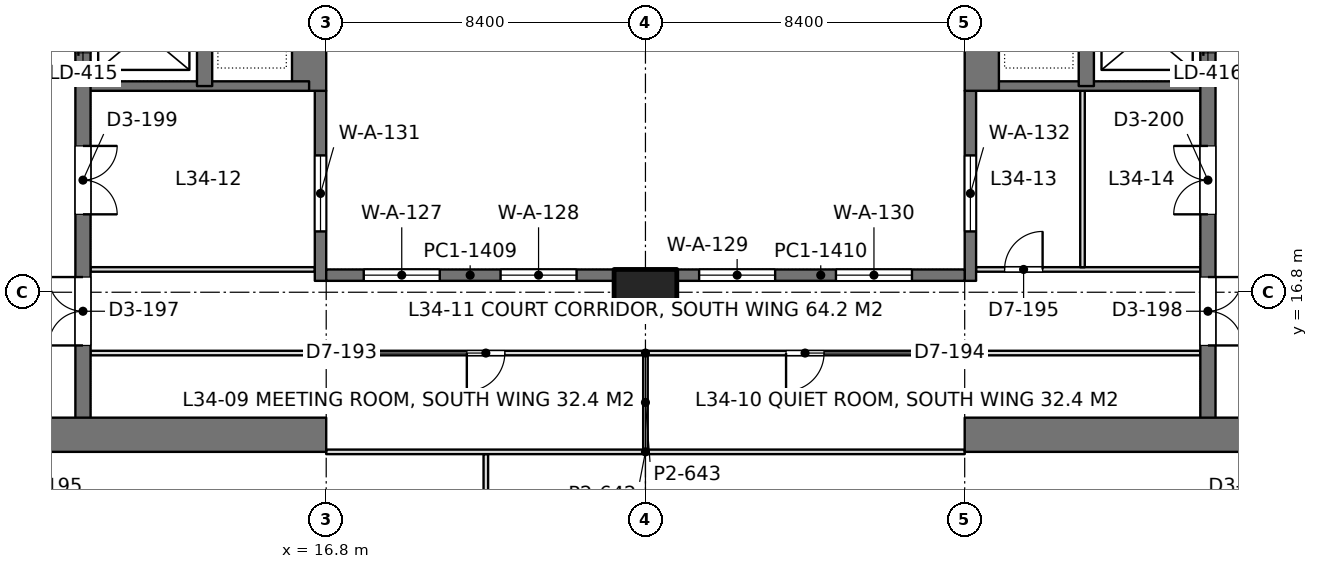
"""IFC4 building model, lengths in metres.
Left out: names, types, materials, properties, quantities, classifications, styles, units other than length and angle.
Written with IfcOpenShell. Run it as: python <this file> out.ifc"""

import sys

from ifc_helpers import new_model, si_unit, direction, frame, frame_2d, origin, origin_2d, place, context, subcontext, project, spatial, rectangle, extrude, element, fill, save


model = new_model("IFC4")
c1 = context("Model", 3, precision=1e-05, world=origin(), true_north=direction((0.0, 1.0)))
c2 = subcontext(c1, "Body", "Model", "MODEL_VIEW")
j1 = project(units=[si_unit("LENGTHUNIT", "METRE"), si_unit("PLANEANGLEUNIT", "RADIAN")], contexts=[c1])
p1 = place(None, origin())
s1 = spatial("IfcSite", under=j1, at=p1, CompositionType="ELEMENT")
p2 = place(p1, origin())
s2 = spatial("IfcBuilding", under=s1, at=p2, CompositionType="ELEMENT")
p3 = place(p2, frame((0.0, 0.0, 151.2)))
s3 = spatial("IfcBuildingStorey", under=s2, at=p3, CompositionType="ELEMENT", Elevation=151.2)
p4 = place(p3, frame((25.2, 16.8, 0.0), z_axis=(0.0, 0.0, 1.0), x_axis=(1.0, 0.0, 0.0)))
e1 = element("IfcColumn", 1, at=p4, inside=s3, PredefinedType="COLUMN", context=c2, shape_type="SweptSolid", body=[
    extrude(rectangle(XDim=1.65, YDim=1.2, at=origin_2d()), origin(), (0.0, 0.0, 1.0), 4.2),
])
p5 = place(p3, frame((-1.2, 13.05, 0.0), z_axis=(0.0, 0.0, 1.0), x_axis=(1.0, 0.0, 0.0)))
e2 = element("IfcWall", 2, at=p5, inside=s3, PredefinedType="SHEAR", context=c2, shape_type="SweptSolid", body=[
    extrude(rectangle(XDim=18.0, YDim=0.9, at=frame_2d((9.0, 0.0))), origin(), (0.0, 0.0, 1.0), 4.2),
])
p6 = place(p5, frame((8.95, 0.0, 0.0)))
e3 = element("IfcOpeningElement", 3, at=p6, cuts=e2, PredefinedType="OPENING", context=c2, shape_type="SweptSolid", body=[
    extrude(rectangle(XDim=1.8, YDim=2.4, at=frame_2d((0.9, 1.2))), frame((0.0, 0.46, 0.0), z_axis=(0.0, -1.0, 0.0), x_axis=(1.0, 0.0, 0.0)), (0.0, 0.0, 1.0), 0.92),
])
p7 = place(p3, frame((16.35, 22.1, 0.0), z_axis=(0.0, 0.0, 1.0), x_axis=(0.0, 1.0, 0.0)))
e4 = element("IfcWall", 4, at=p7, inside=s3, PredefinedType="SHEAR", context=c2, shape_type="SweptSolid", body=[
    extrude(rectangle(XDim=15.25, YDim=0.9, at=frame_2d((7.625, 0.0))), origin(), (0.0, 0.0, 1.0), 4.2),
])
p8 = place(p3, frame((10.4, 13.05, 0.0), z_axis=(0.0, 0.0, 1.0), x_axis=(0.0, 1.0, 0.0)))
e5 = element("IfcWall", 5, at=p8, inside=s3, PredefinedType="SHEAR", context=c2, shape_type="SweptSolid", body=[
    extrude(rectangle(XDim=24.3, YDim=0.4, at=frame_2d((12.15, 0.0))), origin(), (0.0, 0.0, 1.0), 4.2),
])
p9 = place(p8, frame((10.05, 0.0, 0.0)))
e6 = element("IfcOpeningElement", 6, at=p9, cuts=e5, PredefinedType="OPENING", context=c2, shape_type="SweptSolid", body=[
    extrude(rectangle(XDim=1.1, YDim=2.2, at=frame_2d((0.55, 1.1))), frame((0.0, 0.21, 0.0), z_axis=(0.0, -1.0, 0.0), x_axis=(1.0, 0.0, 0.0)), (0.0, 0.0, 1.0), 0.42),
])
p10 = place(p8, frame((12.9, 0.0, 0.0)))
e7 = element("IfcOpeningElement", 7, at=p10, cuts=e5, PredefinedType="OPENING", context=c2, shape_type="SweptSolid", body=[
    extrude(rectangle(XDim=1.1, YDim=2.2, at=frame_2d((0.55, 1.1))), frame((0.0, 0.21, 0.0), z_axis=(0.0, -1.0, 0.0), x_axis=(1.0, 0.0, 0.0)), (0.0, 0.0, 1.0), 0.42),
])
p11 = place(p8, frame((21.45, 0.0, 0.0)))
e8 = element("IfcOpeningElement", 8, at=p11, cuts=e5, PredefinedType="OPENING", context=c2, shape_type="SweptSolid", body=[
    extrude(rectangle(XDim=1.1, YDim=2.2, at=frame_2d((0.55, 1.1))), frame((0.0, 0.21, 0.0), z_axis=(0.0, -1.0, 0.0), x_axis=(1.0, 0.0, 0.0)), (0.0, 0.0, 1.0), 0.42),
])
p12 = place(p8, frame((2.35, 0.0, 0.0)))
e9 = element("IfcOpeningElement", 9, at=p12, cuts=e5, PredefinedType="OPENING", context=c2, shape_type="SweptSolid", body=[
    extrude(rectangle(XDim=1.8, YDim=2.4, at=frame_2d((0.9, 1.2))), frame((0.0, 0.21, 0.0), z_axis=(0.0, -1.0, 0.0), x_axis=(1.0, 0.0, 0.0)), (0.0, 0.0, 1.0), 0.42),
])
p13 = place(p8, frame((5.8, 0.0, 0.0)))
e10 = element("IfcOpeningElement", 10, at=p13, cuts=e5, PredefinedType="OPENING", context=c2, shape_type="SweptSolid", body=[
    extrude(rectangle(XDim=1.8, YDim=2.4, at=frame_2d((0.9, 1.2))), frame((0.0, 0.21, 0.0), z_axis=(0.0, -1.0, 0.0), x_axis=(1.0, 0.0, 0.0)), (0.0, 0.0, 1.0), 0.42),
])
p14 = place(p3, frame((13.6, 22.225, 0.0), z_axis=(0.0, 0.0, 1.0), x_axis=(0.0, 1.0, 0.0)))
e11 = element("IfcWall", 11, at=p14, inside=s3, PredefinedType="SHEAR", context=c2, shape_type="SweptSolid", body=[
    extrude(rectangle(XDim=15.125, YDim=0.4, at=frame_2d((7.562, 0.0))), origin(), (0.0, 0.0, 1.0), 4.2),
])
p15 = place(p3, frame((10.4, 22.225, 0.0), z_axis=(0.0, 0.0, 1.0), x_axis=(1.0, 0.0, 0.0)))
e12 = element("IfcWall", 12, at=p15, inside=s3, PredefinedType="SHEAR", context=c2, shape_type="SweptSolid", body=[
    extrude(rectangle(XDim=5.95, YDim=0.25, at=frame_2d((2.975, 0.0))), origin(), (0.0, 0.0, 1.0), 4.2),
])
p16 = place(p3, frame((33.6, 13.05, 0.0), z_axis=(0.0, 0.0, 1.0), x_axis=(1.0, 0.0, 0.0)))
e13 = element("IfcWall", 13, at=p16, inside=s3, PredefinedType="SHEAR", context=c2, shape_type="SweptSolid", body=[
    extrude(rectangle(XDim=18.0, YDim=0.9, at=frame_2d((9.0, 0.0))), origin(), (0.0, 0.0, 1.0), 4.2),
])
p17 = place(p16, frame((7.25, 0.0, 0.0)))
e14 = element("IfcOpeningElement", 14, at=p17, cuts=e13, PredefinedType="OPENING", context=c2, shape_type="SweptSolid", body=[
    extrude(rectangle(XDim=1.8, YDim=2.4, at=frame_2d((0.9, 1.2))), frame((0.0, 0.46, 0.0), z_axis=(0.0, -1.0, 0.0), x_axis=(1.0, 0.0, 0.0)), (0.0, 0.0, 1.0), 0.92),
])
p18 = place(p3, frame((34.05, 22.1, 0.0), z_axis=(0.0, 0.0, 1.0), x_axis=(0.0, 1.0, 0.0)))
e15 = element("IfcWall", 15, at=p18, inside=s3, PredefinedType="SHEAR", context=c2, shape_type="SweptSolid", body=[
    extrude(rectangle(XDim=15.25, YDim=0.9, at=frame_2d((7.625, 0.0))), origin(), (0.0, 0.0, 1.0), 4.2),
])
p19 = place(p3, frame((40.0, 13.05, 0.0), z_axis=(0.0, 0.0, 1.0), x_axis=(0.0, 1.0, 0.0)))
e16 = element("IfcWall", 16, at=p19, inside=s3, PredefinedType="SHEAR", context=c2, shape_type="SweptSolid", body=[
    extrude(rectangle(XDim=24.3, YDim=0.4, at=frame_2d((12.15, 0.0))), origin(), (0.0, 0.0, 1.0), 4.2),
])
p20 = place(p19, frame((10.05, 0.0, 0.0)))
e17 = element("IfcOpeningElement", 17, at=p20, cuts=e16, PredefinedType="OPENING", context=c2, shape_type="SweptSolid", body=[
    extrude(rectangle(XDim=1.1, YDim=2.2, at=frame_2d((0.55, 1.1))), frame((0.0, 0.21, 0.0), z_axis=(0.0, -1.0, 0.0), x_axis=(1.0, 0.0, 0.0)), (0.0, 0.0, 1.0), 0.42),
])
p21 = place(p19, frame((12.9, 0.0, 0.0)))
e18 = element("IfcOpeningElement", 18, at=p21, cuts=e16, PredefinedType="OPENING", context=c2, shape_type="SweptSolid", body=[
    extrude(rectangle(XDim=1.1, YDim=2.2, at=frame_2d((0.55, 1.1))), frame((0.0, 0.21, 0.0), z_axis=(0.0, -1.0, 0.0), x_axis=(1.0, 0.0, 0.0)), (0.0, 0.0, 1.0), 0.42),
])
p22 = place(p19, frame((21.45, 0.0, 0.0)))
e19 = element("IfcOpeningElement", 19, at=p22, cuts=e16, PredefinedType="OPENING", context=c2, shape_type="SweptSolid", body=[
    extrude(rectangle(XDim=1.1, YDim=2.2, at=frame_2d((0.55, 1.1))), frame((0.0, 0.21, 0.0), z_axis=(0.0, -1.0, 0.0), x_axis=(1.0, 0.0, 0.0)), (0.0, 0.0, 1.0), 0.42),
])
p23 = place(p19, frame((2.35, 0.0, 0.0)))
e20 = element("IfcOpeningElement", 20, at=p23, cuts=e16, PredefinedType="OPENING", context=c2, shape_type="SweptSolid", body=[
    extrude(rectangle(XDim=1.8, YDim=2.4, at=frame_2d((0.9, 1.2))), frame((0.0, 0.21, 0.0), z_axis=(0.0, -1.0, 0.0), x_axis=(1.0, 0.0, 0.0)), (0.0, 0.0, 1.0), 0.42),
])
p24 = place(p19, frame((5.8, 0.0, 0.0)))
e21 = element("IfcOpeningElement", 21, at=p24, cuts=e16, PredefinedType="OPENING", context=c2, shape_type="SweptSolid", body=[
    extrude(rectangle(XDim=1.8, YDim=2.4, at=frame_2d((0.9, 1.2))), frame((0.0, 0.21, 0.0), z_axis=(0.0, -1.0, 0.0), x_axis=(1.0, 0.0, 0.0)), (0.0, 0.0, 1.0), 0.42),
])
p25 = place(p3, frame((36.8, 22.225, 0.0), z_axis=(0.0, 0.0, 1.0), x_axis=(0.0, 1.0, 0.0)))
e22 = element("IfcWall", 22, at=p25, inside=s3, PredefinedType="SHEAR", context=c2, shape_type="SweptSolid", body=[
    extrude(rectangle(XDim=15.125, YDim=0.4, at=frame_2d((7.562, 0.0))), origin(), (0.0, 0.0, 1.0), 4.2),
])
p26 = place(p3, frame((40.0, 22.225, 0.0), z_axis=(0.0, 0.0, 1.0), x_axis=(-1.0, 0.0, 0.0)))
e23 = element("IfcWall", 23, at=p26, inside=s3, PredefinedType="SHEAR", context=c2, shape_type="SweptSolid", body=[
    extrude(rectangle(XDim=5.95, YDim=0.25, at=frame_2d((2.975, 0.0))), origin(), (0.0, 0.0, 1.0), 4.2),
])
p27 = place(p3, frame((16.65, 17.1, 0.0), z_axis=(0.0, 0.0, 1.0), x_axis=(0.0, 1.0, 0.0)))
e24 = element("IfcWall", 24, at=p27, inside=s3, PredefinedType="SOLIDWALL", context=c2, shape_type="SweptSolid", body=[
    extrude(rectangle(XDim=5.0, YDim=0.3, at=frame_2d((2.5, 0.0))), origin(), (0.0, 0.0, 1.0), 4.05),
])
p28 = place(p27, frame((1.3, 0.0, 0.1)))
e25 = element("IfcOpeningElement", 25, at=p28, cuts=e24, PredefinedType="OPENING", context=c2, shape_type="SweptSolid", body=[
    extrude(rectangle(XDim=2.0, YDim=3.0, at=frame_2d((1.0, 1.5))), frame((0.0, 0.16, 0.0), z_axis=(0.0, -1.0, 0.0), x_axis=(1.0, 0.0, 0.0)), (0.0, 0.0, 1.0), 0.32),
])
p29 = place(p3, frame((33.75, 17.1, 0.0), z_axis=(0.0, 0.0, 1.0), x_axis=(0.0, 1.0, 0.0)))
e26 = element("IfcWall", 26, at=p29, inside=s3, PredefinedType="SOLIDWALL", context=c2, shape_type="SweptSolid", body=[
    extrude(rectangle(XDim=5.0, YDim=0.3, at=frame_2d((2.5, 0.0))), origin(), (0.0, 0.0, 1.0), 4.05),
])
p30 = place(p29, frame((1.3, 0.0, 0.1)))
e27 = element("IfcOpeningElement", 27, at=p30, cuts=e26, PredefinedType="OPENING", context=c2, shape_type="SweptSolid", body=[
    extrude(rectangle(XDim=2.0, YDim=3.0, at=frame_2d((1.0, 1.5))), frame((0.0, 0.16, 0.0), z_axis=(0.0, -1.0, 0.0), x_axis=(1.0, 0.0, 0.0)), (0.0, 0.0, 1.0), 0.32),
])
p31 = place(p3, frame((16.8, 17.25, 0.0), z_axis=(0.0, 0.0, 1.0), x_axis=(1.0, 0.0, 0.0)))
e28 = element("IfcWall", 28, at=p31, inside=s3, PredefinedType="SOLIDWALL", context=c2, shape_type="SweptSolid", body=[
    extrude(rectangle(XDim=7.575, YDim=0.3, at=frame_2d((3.788, 0.0))), origin(), (0.0, 0.0, 1.0), 4.05),
])
p32 = place(p31, frame((0.988, 0.0, 0.1)))
e29 = element("IfcOpeningElement", 29, at=p32, cuts=e28, PredefinedType="OPENING", context=c2, shape_type="SweptSolid", body=[
    extrude(rectangle(XDim=2.0, YDim=3.0, at=frame_2d((1.0, 1.5))), frame((0.0, 0.16, 0.0), z_axis=(0.0, -1.0, 0.0), x_axis=(1.0, 0.0, 0.0)), (0.0, 0.0, 1.0), 0.32),
])
p33 = place(p31, frame((4.587, 0.0, 0.1)))
e30 = element("IfcOpeningElement", 30, at=p33, cuts=e28, PredefinedType="OPENING", context=c2, shape_type="SweptSolid", body=[
    extrude(rectangle(XDim=2.0, YDim=3.0, at=frame_2d((1.0, 1.5))), frame((0.0, 0.16, 0.0), z_axis=(0.0, -1.0, 0.0), x_axis=(1.0, 0.0, 0.0)), (0.0, 0.0, 1.0), 0.32),
])
p34 = place(p3, frame((26.025, 17.25, 0.0), z_axis=(0.0, 0.0, 1.0), x_axis=(1.0, 0.0, 0.0)))
e31 = element("IfcWall", 31, at=p34, inside=s3, PredefinedType="SOLIDWALL", context=c2, shape_type="SweptSolid", body=[
    extrude(rectangle(XDim=7.575, YDim=0.3, at=frame_2d((3.788, 0.0))), origin(), (0.0, 0.0, 1.0), 4.05),
])
p35 = place(p34, frame((0.587, 0.0, 0.1)))
e32 = element("IfcOpeningElement", 32, at=p35, cuts=e31, PredefinedType="OPENING", context=c2, shape_type="SweptSolid", body=[
    extrude(rectangle(XDim=2.0, YDim=3.0, at=frame_2d((1.0, 1.5))), frame((0.0, 0.16, 0.0), z_axis=(0.0, -1.0, 0.0), x_axis=(1.0, 0.0, 0.0)), (0.0, 0.0, 1.0), 0.32),
])
p36 = place(p34, frame((4.188, 0.0, 0.1)))
e33 = element("IfcOpeningElement", 33, at=p36, cuts=e31, PredefinedType="OPENING", context=c2, shape_type="SweptSolid", body=[
    extrude(rectangle(XDim=2.0, YDim=3.0, at=frame_2d((1.0, 1.5))), frame((0.0, 0.16, 0.0), z_axis=(0.0, -1.0, 0.0), x_axis=(1.0, 0.0, 0.0)), (0.0, 0.0, 1.0), 0.32),
])
p37 = place(p3, frame((10.598, 17.4, 0.0), z_axis=(0.0, 0.0, 1.0), x_axis=(1.0, 0.0, 0.0)))
e34 = element("IfcWall", 34, at=p37, inside=s3, PredefinedType="PARTITIONING", context=c2, shape_type="SweptSolid", body=[
    extrude(rectangle(XDim=5.904, YDim=0.12, at=frame_2d((2.952, 0.0))), origin(), (0.0, 0.0, 1.0), 3.55),
])
p38 = place(p3, frame((33.898, 17.4, 0.0), z_axis=(0.0, 0.0, 1.0), x_axis=(1.0, 0.0, 0.0)))
e35 = element("IfcWall", 35, at=p38, inside=s3, PredefinedType="PARTITIONING", context=c2, shape_type="SweptSolid", body=[
    extrude(rectangle(XDim=5.904, YDim=0.12, at=frame_2d((2.952, 0.0))), origin(), (0.0, 0.0, 1.0), 3.55),
])
p39 = place(p38, frame((0.752, 0.0, 0.0)))
e36 = element("IfcOpeningElement", 36, at=p39, cuts=e35, PredefinedType="OPENING", context=c2, shape_type="SweptSolid", body=[
    extrude(rectangle(XDim=1.0, YDim=2.4, at=frame_2d((0.5, 1.2))), frame((0.0, 0.07, 0.0), z_axis=(0.0, -1.0, 0.0), x_axis=(1.0, 0.0, 0.0)), (0.0, 0.0, 1.0), 0.14),
])
p40 = place(p3, frame((36.7, 17.458, 0.0), z_axis=(0.0, 0.0, 1.0), x_axis=(0.0, 1.0, 0.0)))
e37 = element("IfcWall", 37, at=p40, inside=s3, PredefinedType="PARTITIONING", context=c2, shape_type="SweptSolid", body=[
    extrude(rectangle(XDim=4.644, YDim=0.12, at=frame_2d((2.322, 0.0))), origin(), (0.0, 0.0, 1.0), 3.6),
])
p41 = place(p3, frame((21.0, 6.298, 0.0), z_axis=(0.0, 0.0, 1.0), x_axis=(0.0, 1.0, 0.0)))
e38 = element("IfcWall", 38, at=p41, inside=s3, PredefinedType="PARTITIONING", context=c2, shape_type="SweptSolid", body=[
    extrude(rectangle(XDim=6.244, YDim=0.12, at=frame_2d((3.122, 0.0))), origin(), (0.0, 0.0, 1.0), 3.55),
])
for number, where, z_axis, x_axis in (
    (39, (10.598, 15.2, 0.0), (0.0, 0.0, 1.0), (1.0, 0.0, 0.0)),
    (40, (33.598, 15.2, 0.0), (0.0, 0.0, 1.0), (1.0, 0.0, 0.0)),
):
    element("IfcWall", number, at=place(p3, frame(where, z_axis=z_axis, x_axis=x_axis)), inside=s3, PredefinedType="PARTITIONING", context=c2, shape_type="SweptSolid", body=[
        extrude(rectangle(XDim=6.204, YDim=0.12, at=frame_2d((3.102, 0.0))), origin(), (0.0, 0.0, 1.0), 3.55),
    ])
p42 = place(p3, frame((25.2, 12.658, 0.0), z_axis=(0.0, 0.0, 1.0), x_axis=(0.0, 1.0, 0.0)))
e41 = element("IfcWall", 41, at=p42, inside=s3, PredefinedType="PARTITIONING", context=c2, shape_type="SweptSolid", body=[
    extrude(rectangle(XDim=2.484, YDim=0.12, at=frame_2d((1.242, 0.0))), origin(), (0.0, 0.0, 1.0), 3.55),
])
p43 = place(p3, frame((16.798, 15.2, 0.0), z_axis=(0.0, 0.0, 1.0), x_axis=(1.0, 0.0, 0.0)))
e42 = element("IfcWall", 42, at=p43, inside=s3, PredefinedType="PARTITIONING", context=c2, shape_type="SweptSolid", body=[
    extrude(rectangle(XDim=16.804, YDim=0.12, at=frame_2d((8.402, 0.0))), origin(), (0.0, 0.0, 1.0), 3.55),
])
p44 = place(p43, frame((3.702, 0.0, 0.0)))
e43 = element("IfcOpeningElement", 43, at=p44, cuts=e42, PredefinedType="OPENING", context=c2, shape_type="SweptSolid", body=[
    extrude(rectangle(XDim=1.0, YDim=2.4, at=frame_2d((0.5, 1.2))), frame((0.0, 0.07, 0.0), z_axis=(0.0, -1.0, 0.0), x_axis=(1.0, 0.0, 0.0)), (0.0, 0.0, 1.0), 0.14),
])
p45 = place(p43, frame((12.102, 0.0, 0.0)))
e44 = element("IfcOpeningElement", 44, at=p45, cuts=e42, PredefinedType="OPENING", context=c2, shape_type="SweptSolid", body=[
    extrude(rectangle(XDim=1.0, YDim=2.4, at=frame_2d((0.5, 1.2))), frame((0.0, 0.07, 0.0), z_axis=(0.0, -1.0, 0.0), x_axis=(1.0, 0.0, 0.0)), (0.0, 0.0, 1.0), 0.14),
])
p46 = place(p3, frame((16.8, 12.6, 0.0), z_axis=(0.0, 0.0, 1.0), x_axis=(1.0, 0.0, 0.0)))
e45 = element("IfcWall", 45, at=p46, inside=s3, PredefinedType="PARTITIONING", context=c2, shape_type="SweptSolid", body=[
    extrude(rectangle(XDim=16.8, YDim=0.12, at=frame_2d((8.4, 0.0))), origin(), (0.0, 0.0, 1.0), 3.55),
])
p47 = place(p28, origin())
e46 = element("IfcWindow", 46, at=p47, inside=s3, PartitioningType="SINGLE_PANEL", PredefinedType="WINDOW", context=c2, shape_type="SweptSolid", body=[
    extrude(rectangle(XDim=2.0, YDim=3.0, at=frame_2d((1.0, 1.5))), frame((0.0, 0.03, 0.0), z_axis=(0.0, -1.0, 0.0), x_axis=(1.0, 0.0, 0.0)), (0.0, 0.0, 1.0), 0.06),
])
fill(e25, e46)
p48 = place(p30, origin())
e47 = element("IfcWindow", 47, at=p48, inside=s3, PartitioningType="SINGLE_PANEL", PredefinedType="WINDOW", context=c2, shape_type="SweptSolid", body=[
    extrude(rectangle(XDim=2.0, YDim=3.0, at=frame_2d((1.0, 1.5))), frame((0.0, 0.03, 0.0), z_axis=(0.0, -1.0, 0.0), x_axis=(1.0, 0.0, 0.0)), (0.0, 0.0, 1.0), 0.06),
])
fill(e27, e47)
p49 = place(p32, origin())
e48 = element("IfcWindow", 48, at=p49, inside=s3, PartitioningType="SINGLE_PANEL", PredefinedType="WINDOW", context=c2, shape_type="SweptSolid", body=[
    extrude(rectangle(XDim=2.0, YDim=3.0, at=frame_2d((1.0, 1.5))), frame((0.0, 0.03, 0.0), z_axis=(0.0, -1.0, 0.0), x_axis=(1.0, 0.0, 0.0)), (0.0, 0.0, 1.0), 0.06),
])
fill(e29, e48)
p50 = place(p33, origin())
e49 = element("IfcWindow", 49, at=p50, inside=s3, PartitioningType="SINGLE_PANEL", PredefinedType="WINDOW", context=c2, shape_type="SweptSolid", body=[
    extrude(rectangle(XDim=2.0, YDim=3.0, at=frame_2d((1.0, 1.5))), frame((0.0, 0.03, 0.0), z_axis=(0.0, -1.0, 0.0), x_axis=(1.0, 0.0, 0.0)), (0.0, 0.0, 1.0), 0.06),
])
fill(e30, e49)
p51 = place(p35, origin())
e50 = element("IfcWindow", 50, at=p51, inside=s3, PartitioningType="SINGLE_PANEL", PredefinedType="WINDOW", context=c2, shape_type="SweptSolid", body=[
    extrude(rectangle(XDim=2.0, YDim=3.0, at=frame_2d((1.0, 1.5))), frame((0.0, 0.03, 0.0), z_axis=(0.0, -1.0, 0.0), x_axis=(1.0, 0.0, 0.0)), (0.0, 0.0, 1.0), 0.06),
])
fill(e32, e50)
p52 = place(p36, origin())
e51 = element("IfcWindow", 51, at=p52, inside=s3, PartitioningType="SINGLE_PANEL", PredefinedType="WINDOW", context=c2, shape_type="SweptSolid", body=[
    extrude(rectangle(XDim=2.0, YDim=3.0, at=frame_2d((1.0, 1.5))), frame((0.0, 0.03, 0.0), z_axis=(0.0, -1.0, 0.0), x_axis=(1.0, 0.0, 0.0)), (0.0, 0.0, 1.0), 0.06),
])
fill(e33, e51)
p53 = place(p12, origin())
e52 = element("IfcDoor", 52, at=p53, inside=s3, OperationType="DOUBLE_DOOR_SINGLE_SWING", PredefinedType="DOOR", context=c2, shape_type="SweptSolid", body=[
    extrude(rectangle(XDim=1.8, YDim=2.4, at=frame_2d((0.9, 1.2))), frame((0.0, 0.025, 0.0), z_axis=(0.0, -1.0, 0.0), x_axis=(1.0, 0.0, 0.0)), (0.0, 0.0, 1.0), 0.05),
])
fill(e9, e52)
p54 = place(p13, frame((1.8, 0.0, 0.0), z_axis=(0.0, 0.0, 1.0), x_axis=(-1.0, 0.0, 0.0)))
e53 = element("IfcDoor", 53, at=p54, inside=s3, OperationType="DOUBLE_DOOR_SINGLE_SWING", PredefinedType="DOOR", context=c2, shape_type="SweptSolid", body=[
    extrude(rectangle(XDim=1.8, YDim=2.4, at=frame_2d((0.9, 1.2))), frame((0.0, 0.025, 0.0), z_axis=(0.0, -1.0, 0.0), x_axis=(1.0, 0.0, 0.0)), (0.0, 0.0, 1.0), 0.05),
])
fill(e10, e53)
p55 = place(p23, frame((1.8, 0.0, 0.0), z_axis=(0.0, 0.0, 1.0), x_axis=(-1.0, 0.0, 0.0)))
e54 = element("IfcDoor", 54, at=p55, inside=s3, OperationType="DOUBLE_DOOR_SINGLE_SWING", PredefinedType="DOOR", context=c2, shape_type="SweptSolid", body=[
    extrude(rectangle(XDim=1.8, YDim=2.4, at=frame_2d((0.9, 1.2))), frame((0.0, 0.025, 0.0), z_axis=(0.0, -1.0, 0.0), x_axis=(1.0, 0.0, 0.0)), (0.0, 0.0, 1.0), 0.05),
])
fill(e20, e54)
p56 = place(p24, origin())
e55 = element("IfcDoor", 55, at=p56, inside=s3, OperationType="DOUBLE_DOOR_SINGLE_SWING", PredefinedType="DOOR", context=c2, shape_type="SweptSolid", body=[
    extrude(rectangle(XDim=1.8, YDim=2.4, at=frame_2d((0.9, 1.2))), frame((0.0, 0.025, 0.0), z_axis=(0.0, -1.0, 0.0), x_axis=(1.0, 0.0, 0.0)), (0.0, 0.0, 1.0), 0.05),
])
fill(e21, e55)
p57 = place(p39, origin())
e56 = element("IfcDoor", 56, at=p57, inside=s3, OperationType="SINGLE_SWING_RIGHT", PredefinedType="DOOR", context=c2, shape_type="SweptSolid", body=[
    extrude(rectangle(XDim=1.0, YDim=2.4, at=frame_2d((0.5, 1.2))), frame((0.0, 0.025, 0.0), z_axis=(0.0, -1.0, 0.0), x_axis=(1.0, 0.0, 0.0)), (0.0, 0.0, 1.0), 0.05),
])
fill(e36, e56)
p58 = place(p44, frame((1.0, 0.0, 0.0), z_axis=(0.0, 0.0, 1.0), x_axis=(-1.0, 0.0, 0.0)))
e57 = element("IfcDoor", 57, at=p58, inside=s3, OperationType="SINGLE_SWING_RIGHT", PredefinedType="DOOR", context=c2, shape_type="SweptSolid", body=[
    extrude(rectangle(XDim=1.0, YDim=2.4, at=frame_2d((0.5, 1.2))), frame((0.0, 0.025, 0.0), z_axis=(0.0, -1.0, 0.0), x_axis=(1.0, 0.0, 0.0)), (0.0, 0.0, 1.0), 0.05),
])
fill(e43, e57)
p59 = place(p45, frame((1.0, 0.0, 0.0), z_axis=(0.0, 0.0, 1.0), x_axis=(-1.0, 0.0, 0.0)))
e58 = element("IfcDoor", 58, at=p59, inside=s3, OperationType="SINGLE_SWING_RIGHT", PredefinedType="DOOR", context=c2, shape_type="SweptSolid", body=[
    extrude(rectangle(XDim=1.0, YDim=2.4, at=frame_2d((0.5, 1.2))), frame((0.0, 0.025, 0.0), z_axis=(0.0, -1.0, 0.0), x_axis=(1.0, 0.0, 0.0)), (0.0, 0.0, 1.0), 0.05),
])
fill(e44, e58)
save(model, sys.argv[1])
